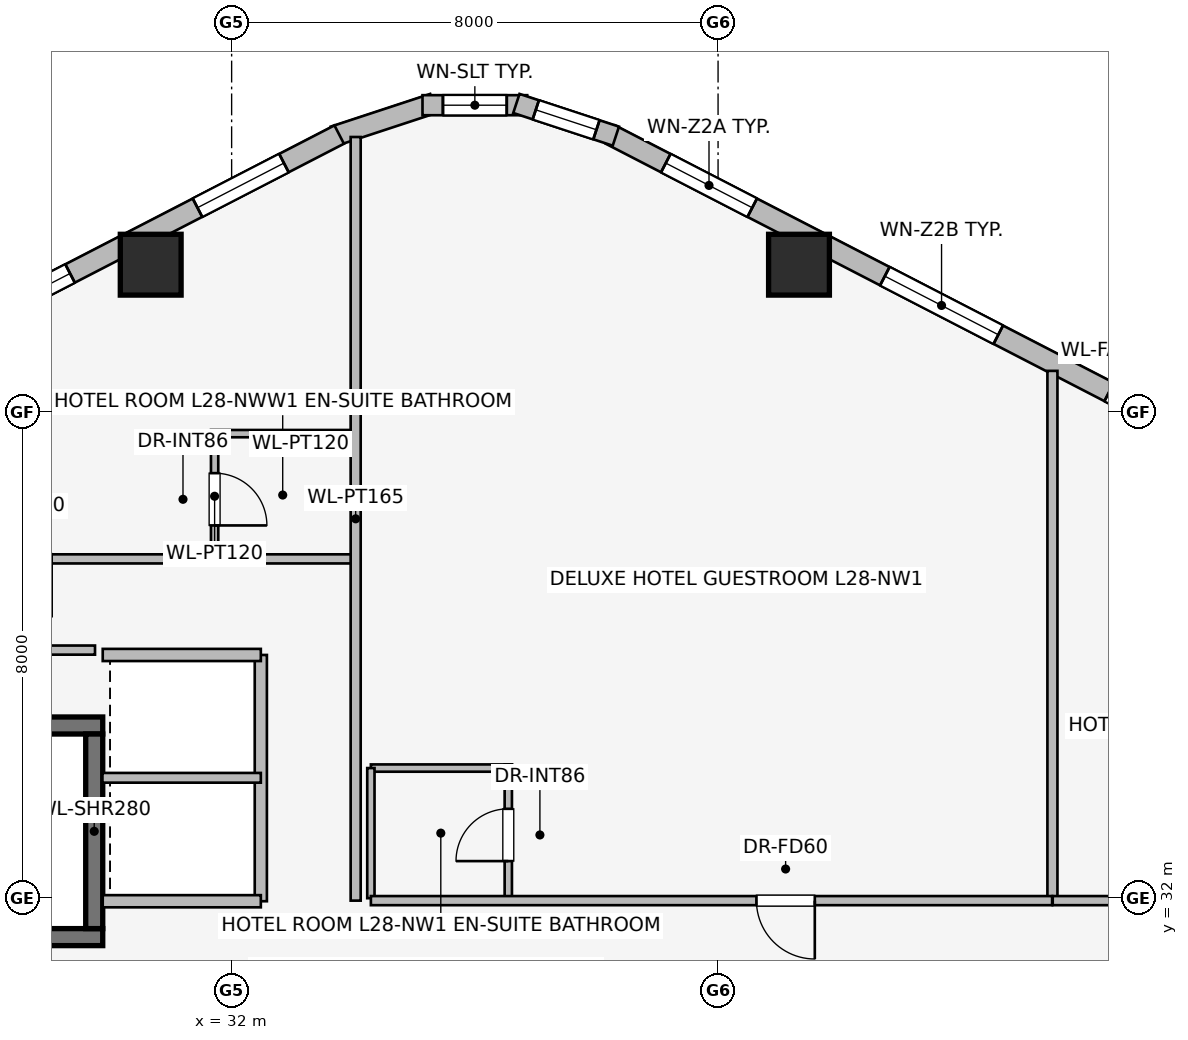
"""IFC4 building model, lengths in metres.
Left out: names, types, materials, properties, quantities, classifications, styles, units other than length and angle.
Written with IfcOpenShell. Run it as: python <this file> out.ifc"""

import sys

from ifc_helpers import new_model, si_unit, direction, frame, frame_2d, origin, origin_2d, place, context, subcontext, project, spatial, rectangle, extrude, element, fill, save


model = new_model("IFC4")
c1 = context("Model", 3, precision=1e-05, world=origin(), true_north=direction((0.0, 1.0)))
c2 = subcontext(c1, "Body", "Model", "MODEL_VIEW")
j1 = project(units=[si_unit("LENGTHUNIT", "METRE"), si_unit("PLANEANGLEUNIT", "RADIAN")], contexts=[c1])
p1 = place(None, origin())
s1 = spatial("IfcSite", under=j1, at=p1, CompositionType="ELEMENT")
p2 = place(p1, origin())
s2 = spatial("IfcBuilding", under=s1, at=p2, CompositionType="ELEMENT")
p3 = place(p2, frame((0.0, 0.0, 108.45)))
s3 = spatial("IfcBuildingStorey", under=s2, at=p3, CompositionType="ELEMENT", Elevation=108.45)
p4 = place(p3, frame((21.52, 31.36, 0.0), z_axis=(0.0, 0.0, 1.0), x_axis=(1.0, 0.0, 0.0)))
e1 = element("IfcWall", 1, at=p4, inside=s3, PredefinedType="SHEAR", context=c2, shape_type="SweptSolid", body=[
    extrude(rectangle(XDim=8.36, YDim=0.28, at=frame_2d((4.18, 0.0))), origin(), (0.0, 0.0, 1.0), 3.45),
])
p5 = place(p4, frame((0.45, 0.0, 0.0)))
e2 = element("IfcOpeningElement", 2, at=p5, cuts=e1, PredefinedType="OPENING", context=c2, shape_type="SweptSolid", body=[
    extrude(rectangle(XDim=1.05, YDim=2.0, at=frame_2d((0.525, 1.0))), frame((0.0, 0.15, 0.0), z_axis=(0.0, -1.0, 0.0), x_axis=(1.0, 0.0, 0.0)), (0.0, 0.0, 1.0), 0.3),
])
p6 = place(p3, frame((29.88, 34.84, 0.0), z_axis=(0.0, 0.0, 1.0), x_axis=(-1.0, 0.0, 0.0)))
e3 = element("IfcWall", 3, at=p6, inside=s3, PredefinedType="SHEAR", context=c2, shape_type="SweptSolid", body=[
    extrude(rectangle(XDim=8.36, YDim=0.28, at=frame_2d((4.18, 0.0))), origin(), (0.0, 0.0, 1.0), 3.45),
])
p7 = place(p3, frame((29.74, 31.5, 0.0), z_axis=(0.0, 0.0, 1.0), x_axis=(0.0, 1.0, 0.0)))
e4 = element("IfcWall", 4, at=p7, inside=s3, PredefinedType="SHEAR", context=c2, shape_type="SweptSolid", body=[
    extrude(rectangle(XDim=3.2, YDim=0.28, at=frame_2d((1.6, 0.0))), origin(), (0.0, 0.0, 1.0), 3.45),
])
for number, where, z_axis, x_axis in (
    (5, (41.331, 42.418, 0.0), (0.0, 0.0, 1.0), (1.0, 0.0, 0.0)),
    (6, (30.669, 42.418, 0.0), (0.0, 0.0, 1.0), (1.0, 0.0, 0.0)),
):
    element("IfcColumn", number, at=place(p3, frame(where, z_axis=z_axis, x_axis=x_axis)), inside=s3, PredefinedType="COLUMN", context=c2, shape_type="SweptSolid", body=[
        extrude(rectangle(XDim=1.0, YDim=1.0, at=origin_2d()), origin(), (0.0, 0.0, 1.0), 3.45),
    ])
p8 = place(p3, frame((38.231, 44.558, 0.0), z_axis=(0.0, 0.0, 1.0), x_axis=(0.888613612362, -0.458656568606, 0.0)))
e7 = element("IfcWall", 7, at=p8, inside=s3, PredefinedType="STANDARD", context=c2, shape_type="SweptSolid", body=[
    extrude(rectangle(XDim=18.681, YDim=0.34, at=frame_2d((9.34, 0.0))), origin(), (0.0, 0.0, 1.0), 3.16),
])
p9 = place(p8, frame((1.023, 0.0, 0.75)))
e8 = element("IfcOpeningElement", 8, at=p9, cuts=e7, PredefinedType="OPENING", context=c2, shape_type="SweptSolid", body=[
    extrude(rectangle(XDim=1.6, YDim=1.55, at=frame_2d((0.8, 0.775))), frame((0.0, 0.18, 0.0), z_axis=(0.0, -1.0, 0.0), x_axis=(1.0, 0.0, 0.0)), (0.0, 0.0, 1.0), 0.36),
])
p10 = place(p8, frame((5.077, 0.0, 0.75)))
e9 = element("IfcOpeningElement", 9, at=p10, cuts=e7, PredefinedType="OPENING", context=c2, shape_type="SweptSolid", body=[
    extrude(rectangle(XDim=2.1, YDim=1.5, at=frame_2d((1.05, 0.75))), frame((0.0, 0.18, 0.0), z_axis=(0.0, -1.0, 0.0), x_axis=(1.0, 0.0, 0.0)), (0.0, 0.0, 1.0), 0.36),
])
p11 = place(p8, frame((9.229, 0.0, 0.75)))
e10 = element("IfcOpeningElement", 10, at=p11, cuts=e7, PredefinedType="OPENING", context=c2, shape_type="SweptSolid", body=[
    extrude(rectangle(XDim=1.6, YDim=1.55, at=frame_2d((0.8, 0.775))), frame((0.0, 0.18, 0.0), z_axis=(0.0, -1.0, 0.0), x_axis=(1.0, 0.0, 0.0)), (0.0, 0.0, 1.0), 0.36),
])
p12 = place(p8, frame((12.079, 0.0, 0.75)))
e11 = element("IfcOpeningElement", 11, at=p12, cuts=e7, PredefinedType="OPENING", context=c2, shape_type="SweptSolid", body=[
    extrude(rectangle(XDim=1.6, YDim=1.55, at=frame_2d((0.8, 0.775))), frame((0.0, 0.18, 0.0), z_axis=(0.0, -1.0, 0.0), x_axis=(1.0, 0.0, 0.0)), (0.0, 0.0, 1.0), 0.36),
])
p13 = place(p8, frame((15.808, 0.0, 0.75)))
e12 = element("IfcOpeningElement", 12, at=p13, cuts=e7, PredefinedType="OPENING", context=c2, shape_type="SweptSolid", body=[
    extrude(rectangle(XDim=2.1, YDim=1.5, at=frame_2d((1.05, 0.75))), frame((0.0, 0.18, 0.0), z_axis=(0.0, -1.0, 0.0), x_axis=(1.0, 0.0, 0.0)), (0.0, 0.0, 1.0), 0.36),
])
p14 = place(p3, frame((33.681, 44.532, 0.0), z_axis=(0.0, 0.0, 1.0), x_axis=(0.949937416267, 0.312440242569, 0.0)))
e13 = element("IfcWall", 13, at=p14, inside=s3, PredefinedType="STANDARD", context=c2, shape_type="SweptSolid", body=[
    extrude(rectangle(XDim=1.722, YDim=0.33, at=frame_2d((0.861, 0.0))), origin(), (0.0, 0.0, 1.0), 3.16),
])
p15 = place(p3, frame((35.139, 45.041, 0.0), z_axis=(0.0, 0.0, 1.0), x_axis=(1.0, 0.0, 0.0)))
e14 = element("IfcWall", 14, at=p15, inside=s3, PredefinedType="STANDARD", context=c2, shape_type="SweptSolid", body=[
    extrude(rectangle(XDim=1.722, YDim=0.33, at=frame_2d((0.861, 0.0))), origin(), (0.0, 0.0, 1.0), 3.16),
])
p16 = place(p15, frame((0.336, 0.0, 0.75)))
e15 = element("IfcOpeningElement", 15, at=p16, cuts=e14, PredefinedType="OPENING", context=c2, shape_type="SweptSolid", body=[
    extrude(rectangle(XDim=1.05, YDim=1.4, at=frame_2d((0.525, 0.7))), frame((0.0, 0.175, 0.0), z_axis=(0.0, -1.0, 0.0), x_axis=(1.0, 0.0, 0.0)), (0.0, 0.0, 1.0), 0.35),
])
p17 = place(p3, frame((36.683, 45.07, 0.0), z_axis=(0.0, 0.0, 1.0), x_axis=(0.949937416267, -0.312440242569, 0.0)))
e16 = element("IfcWall", 16, at=p17, inside=s3, PredefinedType="STANDARD", context=c2, shape_type="SweptSolid", body=[
    extrude(rectangle(XDim=1.722, YDim=0.33, at=frame_2d((0.861, 0.0))), origin(), (0.0, 0.0, 1.0), 3.16),
])
p18 = place(p17, frame((0.336, 0.0, 0.75)))
e17 = element("IfcOpeningElement", 17, at=p18, cuts=e16, PredefinedType="OPENING", context=c2, shape_type="SweptSolid", body=[
    extrude(rectangle(XDim=1.05, YDim=1.4, at=frame_2d((0.525, 0.7))), frame((0.0, 0.175, 0.0), z_axis=(0.0, -1.0, 0.0), x_axis=(1.0, 0.0, 0.0)), (0.0, 0.0, 1.0), 0.35),
])
p19 = place(p3, frame((17.169, 35.99, 0.0), z_axis=(0.0, 0.0, 1.0), x_axis=(0.888613612362, 0.458656568606, 0.0)))
e18 = element("IfcWall", 18, at=p19, inside=s3, PredefinedType="STANDARD", context=c2, shape_type="SweptSolid", body=[
    extrude(rectangle(XDim=18.681, YDim=0.34, at=frame_2d((9.34, 0.0))), origin(), (0.0, 0.0, 1.0), 3.16),
])
p20 = place(p19, frame((1.023, 0.0, 0.75)))
e19 = element("IfcOpeningElement", 19, at=p20, cuts=e18, PredefinedType="OPENING", context=c2, shape_type="SweptSolid", body=[
    extrude(rectangle(XDim=1.6, YDim=1.55, at=frame_2d((0.8, 0.775))), frame((0.0, 0.18, 0.0), z_axis=(0.0, -1.0, 0.0), x_axis=(1.0, 0.0, 0.0)), (0.0, 0.0, 1.0), 0.36),
])
p21 = place(p19, frame((4.981, 0.0, 0.75)))
e20 = element("IfcOpeningElement", 20, at=p21, cuts=e18, PredefinedType="OPENING", context=c2, shape_type="SweptSolid", body=[
    extrude(rectangle(XDim=2.1, YDim=1.5, at=frame_2d((1.05, 0.75))), frame((0.0, 0.18, 0.0), z_axis=(0.0, -1.0, 0.0), x_axis=(1.0, 0.0, 0.0)), (0.0, 0.0, 1.0), 0.36),
])
p22 = place(p19, frame((8.29, 0.0, 0.75)))
e21 = element("IfcOpeningElement", 21, at=p22, cuts=e18, PredefinedType="OPENING", context=c2, shape_type="SweptSolid", body=[
    extrude(rectangle(XDim=2.1, YDim=1.5, at=frame_2d((1.05, 0.75))), frame((0.0, 0.18, 0.0), z_axis=(0.0, -1.0, 0.0), x_axis=(1.0, 0.0, 0.0)), (0.0, 0.0, 1.0), 0.36),
])
p23 = place(p19, frame((11.6, 0.0, 0.75)))
e22 = element("IfcOpeningElement", 22, at=p23, cuts=e18, PredefinedType="OPENING", context=c2, shape_type="SweptSolid", body=[
    extrude(rectangle(XDim=2.1, YDim=1.5, at=frame_2d((1.05, 0.75))), frame((0.0, 0.18, 0.0), z_axis=(0.0, -1.0, 0.0), x_axis=(1.0, 0.0, 0.0)), (0.0, 0.0, 1.0), 0.36),
])
p24 = place(p19, frame((16.058, 0.0, 0.75)))
e23 = element("IfcOpeningElement", 23, at=p24, cuts=e18, PredefinedType="OPENING", context=c2, shape_type="SweptSolid", body=[
    extrude(rectangle(XDim=1.6, YDim=1.55, at=frame_2d((0.8, 0.775))), frame((0.0, 0.18, 0.0), z_axis=(0.0, -1.0, 0.0), x_axis=(1.0, 0.0, 0.0)), (0.0, 0.0, 1.0), 0.36),
])
p25 = place(p3, frame((32.48, 31.95, 0.0), z_axis=(0.0, 0.0, 1.0), x_axis=(0.0, 1.0, 0.0)))
e24 = element("IfcWall", 24, at=p25, inside=s3, PredefinedType="PARTITIONING", context=c2, shape_type="SweptSolid", body=[
    extrude(rectangle(XDim=4.05, YDim=0.2, at=frame_2d((2.025, 0.0))), origin(), (0.0, 0.0, 1.0), 3.16),
])
for number, where, z_axis, x_axis in (
    (25, (29.88, 36.0, 0.0), (0.0, 0.0, 1.0), (1.0, 0.0, 0.0)),
    (26, (32.48, 31.95, 0.0), (0.0, 0.0, 1.0), (-1.0, 0.0, 0.0)),
):
    element("IfcWall", number, at=place(p3, frame(where, z_axis=z_axis, x_axis=x_axis)), inside=s3, PredefinedType="PARTITIONING", context=c2, shape_type="SweptSolid", body=[
        extrude(rectangle(XDim=2.6, YDim=0.2, at=frame_2d((1.3, 0.0))), origin(), (0.0, 0.0, 1.0), 3.16),
    ])
p26 = place(p3, frame((29.875, 33.98, 0.0), z_axis=(0.0, 0.0, 1.0), x_axis=(1.0, 0.0, 0.0)))
e27 = element("IfcWall", 27, at=p26, inside=s3, PredefinedType="PARTITIONING", context=c2, shape_type="SweptSolid", body=[
    extrude(rectangle(XDim=2.605, YDim=0.16, at=frame_2d((1.302, 0.0))), origin(), (0.0, 0.0, 1.0), 3.16),
])
p27 = place(p3, frame((34.0, 39.64, 0.0), z_axis=(0.0, 0.0, 1.0), x_axis=(-1.0, 0.0, 0.0)))
e28 = element("IfcWall", 28, at=p27, inside=s3, PredefinedType="PARTITIONING", context=c2, shape_type="SweptSolid", body=[
    extrude(rectangle(XDim=2.34, YDim=0.12, at=frame_2d((1.17, 0.0))), origin(), (0.0, 0.0, 1.0), 3.16),
])
p28 = place(p3, frame((31.72, 39.64, 0.0), z_axis=(0.0, 0.0, 1.0), x_axis=(0.0, -1.0, 0.0)))
e29 = element("IfcWall", 29, at=p28, inside=s3, PredefinedType="PARTITIONING", context=c2, shape_type="SweptSolid", body=[
    extrude(rectangle(XDim=2.06, YDim=0.12, at=frame_2d((1.03, 0.0))), origin(), (0.0, 0.0, 1.0), 3.16),
])
p29 = place(p28, frame((0.65, 0.0, 0.0)))
e30 = element("IfcOpeningElement", 30, at=p29, cuts=e29, PredefinedType="OPENING", context=c2, shape_type="SweptSolid", body=[
    extrude(rectangle(XDim=0.86, YDim=2.0, at=frame_2d((0.43, 1.0))), frame((0.0, 0.07, 0.0), z_axis=(0.0, -1.0, 0.0), x_axis=(1.0, 0.0, 0.0)), (0.0, 0.0, 1.0), 0.14),
])
p30 = place(p3, frame((34.0, 37.58, 0.0), z_axis=(0.0, 0.0, 1.0), x_axis=(-1.0, 0.0, 0.0)))
e31 = element("IfcWall", 31, at=p30, inside=s3, PredefinedType="PARTITIONING", context=c2, shape_type="SweptSolid", body=[
    extrude(rectangle(XDim=13.707, YDim=0.15, at=frame_2d((6.854, 0.0))), origin(), (0.0, 0.0, 1.0), 2.552),
])
p31 = place(p30, frame((4.96, 0.0, 0.0)))
e32 = element("IfcOpeningElement", 32, at=p31, cuts=e31, PredefinedType="OPENING", context=c2, shape_type="SweptSolid", body=[
    extrude(rectangle(XDim=0.96, YDim=2.0, at=frame_2d((0.48, 1.0))), frame((0.0, 0.085, 0.0), z_axis=(0.0, -1.0, 0.0), x_axis=(1.0, 0.0, 0.0)), (0.0, 0.0, 1.0), 0.17),
])
p32 = place(p3, frame((34.04, 31.96, 0.0), z_axis=(0.0, 0.0, 1.0), x_axis=(0.0, 1.0, 0.0)))
e33 = element("IfcWall", 33, at=p32, inside=s3, PredefinedType="PARTITIONING", context=c2, shape_type="SweptSolid", body=[
    extrude(rectangle(XDim=12.558, YDim=0.165, at=frame_2d((6.279, 0.0))), origin(), (0.0, 0.0, 1.0), 3.16),
])
p33 = place(p3, frame((45.499, 31.97, 0.0), z_axis=(0.0, 0.0, 1.0), x_axis=(0.0, 1.0, 0.0)))
e34 = element("IfcWall", 34, at=p33, inside=s3, PredefinedType="PARTITIONING", context=c2, shape_type="SweptSolid", body=[
    extrude(rectangle(XDim=8.702, YDim=0.165, at=frame_2d((4.351, 0.0))), origin(), (0.0, 0.0, 1.0), 3.16),
])
p34 = place(p3, frame((36.55, 31.96, 0.0), z_axis=(0.0, 0.0, 1.0), x_axis=(0.0, 1.0, 0.0)))
e35 = element("IfcWall", 35, at=p34, inside=s3, PredefinedType="PARTITIONING", context=c2, shape_type="SweptSolid", body=[
    extrude(rectangle(XDim=2.24, YDim=0.12, at=frame_2d((1.12, 0.0))), origin(), (0.0, 0.0, 1.0), 3.16),
])
p35 = place(p34, frame((0.65, 0.0, 0.0)))
e36 = element("IfcOpeningElement", 36, at=p35, cuts=e35, PredefinedType="OPENING", context=c2, shape_type="SweptSolid", body=[
    extrude(rectangle(XDim=0.86, YDim=2.0, at=frame_2d((0.43, 1.0))), frame((0.0, 0.07, 0.0), z_axis=(0.0, -1.0, 0.0), x_axis=(1.0, 0.0, 0.0)), (0.0, 0.0, 1.0), 0.14),
])
p36 = place(p3, frame((36.61, 34.14, 0.0), z_axis=(0.0, 0.0, 1.0), x_axis=(-1.0, 0.0, 0.0)))
e37 = element("IfcWall", 37, at=p36, inside=s3, PredefinedType="PARTITIONING", context=c2, shape_type="SweptSolid", body=[
    extrude(rectangle(XDim=2.32, YDim=0.12, at=frame_2d((1.16, 0.0))), origin(), (0.0, 0.0, 1.0), 3.16),
])
p37 = place(p3, frame((34.29, 34.14, 0.0), z_axis=(0.0, 0.0, 1.0), x_axis=(0.0, -1.0, 0.0)))
e38 = element("IfcWall", 38, at=p37, inside=s3, PredefinedType="PARTITIONING", context=c2, shape_type="SweptSolid", body=[
    extrude(rectangle(XDim=2.14, YDim=0.12, at=frame_2d((1.07, 0.0))), origin(), (0.0, 0.0, 1.0), 3.16),
])
p38 = place(p3, frame((45.494, 31.96, 0.0), z_axis=(0.0, 0.0, 1.0), x_axis=(-1.0, 0.0, 0.0)))
e39 = element("IfcWall", 39, at=p38, inside=s3, PredefinedType="PARTITIONING", context=c2, shape_type="SweptSolid", body=[
    extrude(rectangle(XDim=11.204, YDim=0.15, at=frame_2d((5.602, 0.0))), origin(), (0.0, 0.0, 1.0), 3.16),
])
p39 = place(p38, frame((3.903, 0.0, 0.0)))
e40 = element("IfcOpeningElement", 40, at=p39, cuts=e39, PredefinedType="OPENING", context=c2, shape_type="SweptSolid", body=[
    extrude(rectangle(XDim=0.96, YDim=2.0, at=frame_2d((0.48, 1.0))), frame((0.0, 0.085, 0.0), z_axis=(0.0, -1.0, 0.0), x_axis=(1.0, 0.0, 0.0)), (0.0, 0.0, 1.0), 0.17),
])
p40 = place(p3, frame((56.987, 31.96, 0.0), z_axis=(0.0, 0.0, 1.0), x_axis=(-1.0, 0.0, 0.0)))
e41 = element("IfcWall", 41, at=p40, inside=s3, PredefinedType="PARTITIONING", context=c2, shape_type="SweptSolid", body=[
    extrude(rectangle(XDim=11.483, YDim=0.15, at=frame_2d((5.742, 0.0))), origin(), (0.0, 0.0, 1.0), 3.16),
])
p41 = place(p40, frame((5.381, 0.0, 0.0)))
e42 = element("IfcOpeningElement", 42, at=p41, cuts=e41, PredefinedType="OPENING", context=c2, shape_type="SweptSolid", body=[
    extrude(rectangle(XDim=0.96, YDim=2.0, at=frame_2d((0.48, 1.0))), frame((0.0, 0.085, 0.0), z_axis=(0.0, -1.0, 0.0), x_axis=(1.0, 0.0, 0.0)), (0.0, 0.0, 1.0), 0.17),
])
p42 = place(p3, frame((29.753, 36.08, 0.0), z_axis=(0.0, 0.0, 1.0), x_axis=(-1.0, 0.0, 0.0)))
e43 = element("IfcWall", 43, at=p42, inside=s3, PredefinedType="PARTITIONING", context=c2, shape_type="SweptSolid", body=[
    extrude(rectangle(XDim=7.353, YDim=0.15, at=frame_2d((3.677, 0.0))), origin(), (0.0, 0.0, 1.0), 2.552),
])
p43 = place(p9, origin())
e44 = element("IfcWindow", 44, at=p43, inside=s3, PartitioningType="SINGLE_PANEL", PredefinedType="WINDOW", context=c2, shape_type="SweptSolid", body=[
    extrude(rectangle(XDim=1.6, YDim=1.55, at=frame_2d((0.8, 0.775))), frame((0.0, 0.03, 0.0), z_axis=(0.0, -1.0, 0.0), x_axis=(1.0, 0.0, 0.0)), (0.0, 0.0, 1.0), 0.06),
])
fill(e8, e44)
p44 = place(p10, origin())
e45 = element("IfcWindow", 45, at=p44, inside=s3, PartitioningType="SINGLE_PANEL", PredefinedType="WINDOW", context=c2, shape_type="SweptSolid", body=[
    extrude(rectangle(XDim=2.1, YDim=1.5, at=frame_2d((1.05, 0.75))), frame((0.0, 0.03, 0.0), z_axis=(0.0, -1.0, 0.0), x_axis=(1.0, 0.0, 0.0)), (0.0, 0.0, 1.0), 0.06),
])
fill(e9, e45)
p45 = place(p16, origin())
e46 = element("IfcWindow", 46, at=p45, inside=s3, PartitioningType="SINGLE_PANEL", PredefinedType="WINDOW", context=c2, shape_type="SweptSolid", body=[
    extrude(rectangle(XDim=1.05, YDim=1.4, at=frame_2d((0.525, 0.7))), frame((0.0, 0.03, 0.0), z_axis=(0.0, -1.0, 0.0), x_axis=(1.0, 0.0, 0.0)), (0.0, 0.0, 1.0), 0.06),
])
fill(e15, e46)
p46 = place(p18, origin())
e47 = element("IfcWindow", 47, at=p46, inside=s3, PartitioningType="SINGLE_PANEL", PredefinedType="WINDOW", context=c2, shape_type="SweptSolid", body=[
    extrude(rectangle(XDim=1.05, YDim=1.4, at=frame_2d((0.525, 0.7))), frame((0.0, 0.03, 0.0), z_axis=(0.0, -1.0, 0.0), x_axis=(1.0, 0.0, 0.0)), (0.0, 0.0, 1.0), 0.06),
])
fill(e17, e47)
p47 = place(p23, origin())
e48 = element("IfcWindow", 48, at=p47, inside=s3, PartitioningType="SINGLE_PANEL", PredefinedType="WINDOW", context=c2, shape_type="SweptSolid", body=[
    extrude(rectangle(XDim=2.1, YDim=1.5, at=frame_2d((1.05, 0.75))), frame((0.0, 0.03, 0.0), z_axis=(0.0, -1.0, 0.0), x_axis=(1.0, 0.0, 0.0)), (0.0, 0.0, 1.0), 0.06),
])
fill(e22, e48)
p48 = place(p24, origin())
e49 = element("IfcWindow", 49, at=p48, inside=s3, PartitioningType="SINGLE_PANEL", PredefinedType="WINDOW", context=c2, shape_type="SweptSolid", body=[
    extrude(rectangle(XDim=1.6, YDim=1.55, at=frame_2d((0.8, 0.775))), frame((0.0, 0.03, 0.0), z_axis=(0.0, -1.0, 0.0), x_axis=(1.0, 0.0, 0.0)), (0.0, 0.0, 1.0), 0.06),
])
fill(e23, e49)
p49 = place(p29, origin())
e50 = element("IfcDoor", 50, at=p49, inside=s3, OperationType="SINGLE_SWING_RIGHT", PredefinedType="DOOR", context=c2, shape_type="SweptSolid", body=[
    extrude(rectangle(XDim=0.86, YDim=2.0, at=frame_2d((0.43, 1.0))), frame((0.0, 0.025, 0.0), z_axis=(0.0, -1.0, 0.0), x_axis=(1.0, 0.0, 0.0)), (0.0, 0.0, 1.0), 0.05),
])
fill(e30, e50)
p50 = place(p35, origin())
e51 = element("IfcDoor", 51, at=p50, inside=s3, OperationType="SINGLE_SWING_LEFT", PredefinedType="DOOR", context=c2, shape_type="SweptSolid", body=[
    extrude(rectangle(XDim=0.86, YDim=2.0, at=frame_2d((0.43, 1.0))), frame((0.0, 0.025, 0.0), z_axis=(0.0, -1.0, 0.0), x_axis=(1.0, 0.0, 0.0)), (0.0, 0.0, 1.0), 0.05),
])
fill(e36, e51)
p51 = place(p39, origin())
e52 = element("IfcDoor", 52, at=p51, inside=s3, OperationType="SINGLE_SWING_LEFT", PredefinedType="DOOR", context=c2, shape_type="SweptSolid", body=[
    extrude(rectangle(XDim=0.96, YDim=2.0, at=frame_2d((0.48, 1.0))), frame((0.0, 0.025, 0.0), z_axis=(0.0, -1.0, 0.0), x_axis=(1.0, 0.0, 0.0)), (0.0, 0.0, 1.0), 0.05),
])
fill(e40, e52)
save(model, sys.argv[1])
